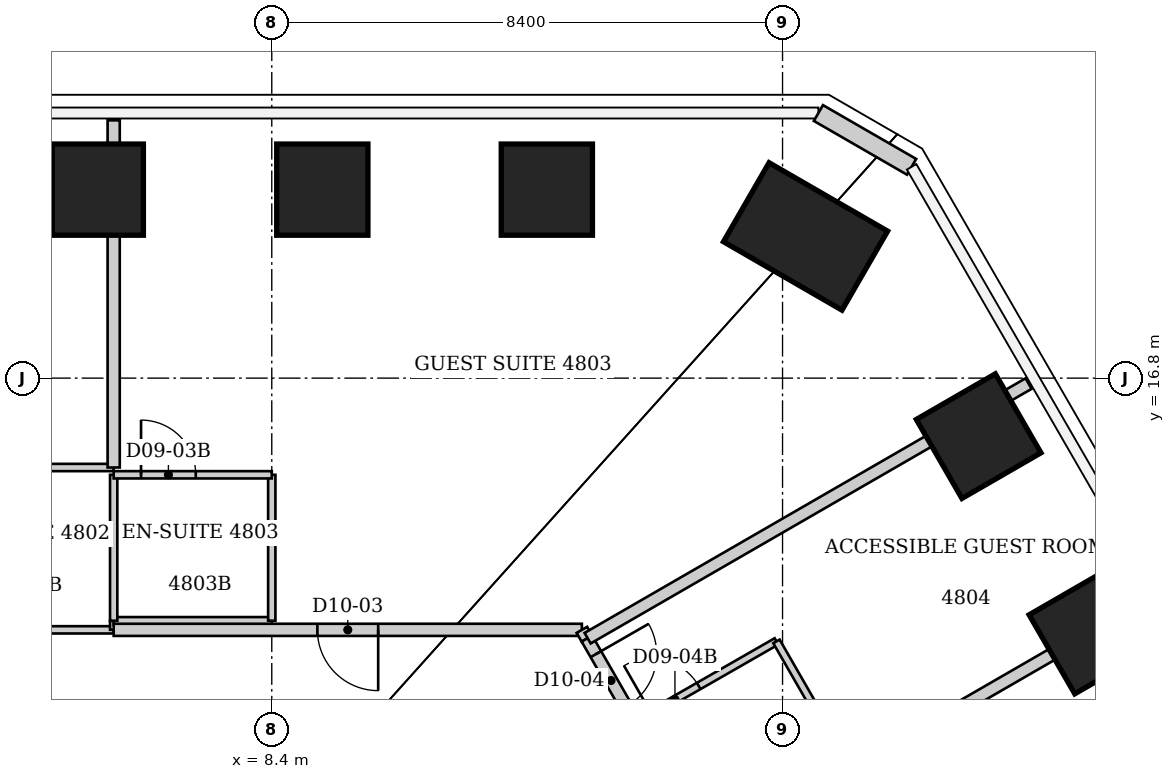
"""IFC4 building model, lengths in metres.
Left out: names, types, materials, properties, quantities, classifications, styles, units other than length and angle.
Written with IfcOpenShell. Run it as: python <this file> out.ifc"""

import sys

from ifc_helpers import new_model, si_unit, direction, frame, frame_2d, origin, origin_2d, place, context, subcontext, project, spatial, rectangle, extrude, element, fill, save


model = new_model("IFC4")
c1 = context("Model", 3, precision=1e-05, world=origin(), true_north=direction((0.0, 1.0)))
c2 = subcontext(c1, "Body", "Model", "MODEL_VIEW")
j1 = project(units=[si_unit("LENGTHUNIT", "METRE"), si_unit("PLANEANGLEUNIT", "RADIAN")], contexts=[c1])
p1 = place(None, origin())
s1 = spatial("IfcSite", under=j1, at=p1, CompositionType="ELEMENT")
p2 = place(p1, origin())
s2 = spatial("IfcBuilding", under=s1, at=p2, CompositionType="ELEMENT")
p3 = place(p2, frame((0.0, 0.0, 194.6)))
s3 = spatial("IfcBuildingStorey", under=s2, at=p3, CompositionType="ELEMENT", Elevation=194.6)
for number, where, z_axis, x_axis in (
    (1, (5.539, 19.9, 0.0), (0.0, 0.0, 1.0), (0.0, 1.0, 0.0)),
    (2, (9.231, 19.9, 0.0), (0.0, 0.0, 1.0), (0.0, 1.0, 0.0)),
    (3, (12.924, 19.9, 0.0), (0.0, 0.0, 1.0), (0.0, 1.0, 0.0)),
):
    element("IfcColumn", number, at=place(p3, frame(where, z_axis=z_axis, x_axis=x_axis)), inside=s3, PredefinedType="COLUMN", context=c2, shape_type="SweptSolid", body=[
        extrude(rectangle(XDim=1.5, YDim=1.5, at=origin_2d()), origin(), (0.0, 0.0, 1.0), 3.8),
    ])
p4 = place(p3, frame((17.178, 19.131, 0.0), z_axis=(0.0, 0.0, 1.0), x_axis=(0.5, 0.866025403784, 0.0)))
e4 = element("IfcColumn", 4, at=p4, inside=s3, PredefinedType="COLUMN", context=c2, shape_type="SweptSolid", body=[
    extrude(rectangle(XDim=1.5, YDim=2.25, at=origin_2d()), origin(), (0.0, 0.0, 1.0), 3.8),
])
for number, where, z_axis, x_axis in (
    (5, (20.025, 15.846, 0.0), (0.0, 0.0, 1.0), (0.866, 0.5, 0.0)),
    (6, (21.88, 12.633, 0.0), (0.0, 0.0, 1.0), (0.866, 0.5, 0.0)),
):
    element("IfcColumn", number, at=place(p3, frame(where, z_axis=z_axis, x_axis=x_axis)), inside=s3, PredefinedType="COLUMN", context=c2, shape_type="SweptSolid", body=[
        extrude(rectangle(XDim=1.5, YDim=1.5, at=origin_2d()), origin(), (0.0, 0.0, 1.0), 3.8),
    ])
p5 = place(p3, frame((17.39, 21.16, 0.0), z_axis=(0.0, 0.0, 1.0), x_axis=(0.866036293601, -0.499981137809, 0.0)))
e7 = element("IfcWall", 7, at=p5, inside=s3, PredefinedType="SOLIDWALL", context=c2, shape_type="SweptSolid", body=[
    extrude(rectangle(XDim=1.77, YDim=0.3, at=frame_2d((0.885, 0.0))), origin(), (0.0, 0.0, 1.0), 3.64),
])
p6 = place(p3, frame((5.8, 12.66, 0.0), z_axis=(0.0, 0.0, 1.0), x_axis=(-1.0, 0.0, 0.0)))
e8 = element("IfcWall", 8, at=p6, inside=s3, PredefinedType="PARTITIONING", context=c2, shape_type="SweptSolid", body=[
    extrude(rectangle(XDim=2.45, YDim=0.12, at=frame_2d((1.225, 0.0))), origin(), (0.0, 0.0, 1.0), 3.64),
])
p7 = place(p3, frame((5.8, 12.81, 0.0), z_axis=(0.0, 0.0, 1.0), x_axis=(0.0, -1.0, 0.0)))
e9 = element("IfcWall", 9, at=p7, inside=s3, PredefinedType="PARTITIONING", context=c2, shape_type="SweptSolid", body=[
    extrude(rectangle(XDim=0.15, YDim=0.12, at=frame_2d((0.075, 0.0))), origin(), (0.0, 0.0, 1.0), 3.64),
])
p8 = place(p3, frame((5.8, 12.81, 0.0), z_axis=(0.0, 0.0, 1.0), x_axis=(1.0, 0.0, 0.0)))
e10 = element("IfcWall", 10, at=p8, inside=s3, PredefinedType="PARTITIONING", context=c2, shape_type="SweptSolid", body=[
    extrude(rectangle(XDim=2.6, YDim=0.12, at=frame_2d((1.3, 0.0))), origin(), (0.0, 0.0, 1.0), 3.64),
])
p9 = place(p3, frame((5.8, 15.21, 0.0), z_axis=(0.0, 0.0, 1.0), x_axis=(0.0, -1.0, 0.0)))
e11 = element("IfcWall", 11, at=p9, inside=s3, PredefinedType="PARTITIONING", context=c2, shape_type="SweptSolid", body=[
    extrude(rectangle(XDim=2.4, YDim=0.12, at=frame_2d((1.2, 0.0))), origin(), (0.0, 0.0, 1.0), 3.64),
])
p10 = place(p3, frame((5.8, 15.33, 0.0), z_axis=(0.0, 0.0, 1.0), x_axis=(-1.0, 0.0, 0.0)))
e12 = element("IfcWall", 12, at=p10, inside=s3, PredefinedType="PARTITIONING", context=c2, shape_type="SweptSolid", body=[
    extrude(rectangle(XDim=2.45, YDim=0.12, at=frame_2d((1.225, 0.0))), origin(), (0.0, 0.0, 1.0), 3.64),
])
p11 = place(p3, frame((5.8, 21.04, 0.0), z_axis=(0.0, 0.0, 1.0), x_axis=(0.0, -1.0, 0.0)))
e13 = element("IfcWall", 13, at=p11, inside=s3, PredefinedType="PARTITIONING", context=c2, shape_type="SweptSolid", body=[
    extrude(rectangle(XDim=5.71, YDim=0.2, at=frame_2d((2.855, 0.0))), origin(), (0.0, 0.0, 1.0), 3.64),
])
p12 = place(p3, frame((8.4, 12.81, 0.0), z_axis=(0.0, 0.0, 1.0), x_axis=(0.0, 1.0, 0.0)))
e14 = element("IfcWall", 14, at=p12, inside=s3, PredefinedType="PARTITIONING", context=c2, shape_type="SweptSolid", body=[
    extrude(rectangle(XDim=2.4, YDim=0.12, at=frame_2d((1.2, 0.0))), origin(), (0.0, 0.0, 1.0), 3.64),
])
p13 = place(p3, frame((8.4, 15.21, 0.0), z_axis=(0.0, 0.0, 1.0), x_axis=(-1.0, 0.0, 0.0)))
e15 = element("IfcWall", 15, at=p13, inside=s3, PredefinedType="PARTITIONING", context=c2, shape_type="SweptSolid", body=[
    extrude(rectangle(XDim=2.6, YDim=0.12, at=frame_2d((1.3, 0.0))), origin(), (0.0, 0.0, 1.0), 3.64),
])
p14 = place(p13, frame((1.25, 0.0, 0.0)))
e16 = element("IfcOpeningElement", 16, at=p14, cuts=e15, PredefinedType="OPENING", context=c2, shape_type="SweptSolid", body=[
    extrude(rectangle(XDim=0.9, YDim=2.03, at=frame_2d((0.45, 1.015))), frame((0.0, 0.06, 0.0), z_axis=(0.0, -1.0, 0.0), x_axis=(1.0, 0.0, 0.0)), (0.0, 0.0, 1.0), 0.12),
])
p15 = place(p3, frame((13.5, 12.66, 0.0), z_axis=(0.0, 0.0, 1.0), x_axis=(-1.0, 0.0, 0.0)))
e17 = element("IfcWall", 17, at=p15, inside=s3, PredefinedType="PARTITIONING", context=c2, shape_type="SweptSolid", body=[
    extrude(rectangle(XDim=7.7, YDim=0.2, at=frame_2d((3.85, 0.0))), origin(), (0.0, 0.0, 1.0), 3.64),
])
p16 = place(p15, frame((3.35, 0.0, 0.0)))
e18 = element("IfcOpeningElement", 18, at=p16, cuts=e17, PredefinedType="OPENING", context=c2, shape_type="SweptSolid", body=[
    extrude(rectangle(XDim=1.0, YDim=2.13, at=frame_2d((0.5, 1.065))), frame((0.0, 0.1, 0.0), z_axis=(0.0, -1.0, 0.0), x_axis=(1.0, 0.0, 0.0)), (0.0, 0.0, 1.0), 0.2),
])
p17 = place(p3, frame((13.5, 12.66, 0.0), z_axis=(0.0, 0.0, 1.0), x_axis=(0.498194987799, -0.867065023013, 0.0)))
e19 = element("IfcWall", 19, at=p17, inside=s3, PredefinedType="PARTITIONING", context=c2, shape_type="SweptSolid", body=[
    extrude(rectangle(XDim=0.166, YDim=0.2, at=frame_2d((0.083, 0.0))), origin(), (0.0, 0.0, 1.0), 3.64),
])
p18 = place(p3, frame((13.583, 12.516, 0.0), z_axis=(0.0, 0.0, 1.0), x_axis=(0.498534585837, -0.866869809559, 0.0)))
e20 = element("IfcWall", 20, at=p18, inside=s3, PredefinedType="PARTITIONING", context=c2, shape_type="SweptSolid", body=[
    extrude(rectangle(XDim=1.59, YDim=0.2, at=frame_2d((0.795, 0.0))), origin(), (0.0, 0.0, 1.0), 3.64),
])
p19 = place(p18, frame((0.295, 0.0, 0.0)))
e21 = element("IfcOpeningElement", 21, at=p19, cuts=e20, PredefinedType="OPENING", context=c2, shape_type="SweptSolid", body=[
    extrude(rectangle(XDim=1.0, YDim=2.13, at=frame_2d((0.5, 1.065))), frame((0.0, 0.1, 0.0), z_axis=(0.0, -1.0, 0.0), x_axis=(1.0, 0.0, 0.0)), (0.0, 0.0, 1.0), 0.2),
])
p20 = place(p3, frame((16.7, 12.47, 0.0), z_axis=(0.0, 0.0, 1.0), x_axis=(-0.867545659855, -0.497357545501, 0.0)))
e22 = element("IfcWall", 22, at=p20, inside=s3, PredefinedType="PARTITIONING", context=c2, shape_type="SweptSolid", body=[
    extrude(rectangle(XDim=2.674, YDim=0.12, at=frame_2d((1.337, 0.0))), origin(), (0.0, 0.0, 1.0), 3.64),
])
p21 = place(p20, frame((1.474, 0.0, 0.0)))
e23 = element("IfcOpeningElement", 23, at=p21, cuts=e22, PredefinedType="OPENING", context=c2, shape_type="SweptSolid", body=[
    extrude(rectangle(XDim=0.9, YDim=2.03, at=frame_2d((0.45, 1.015))), frame((0.0, 0.06, 0.0), z_axis=(0.0, -1.0, 0.0), x_axis=(1.0, 0.0, 0.0)), (0.0, 0.0, 1.0), 0.12),
])
p22 = place(p3, frame((17.92, 10.35, 0.0), z_axis=(0.0, 0.0, 1.0), x_axis=(-0.498791783817, 0.866721844883, 0.0)))
e24 = element("IfcWall", 24, at=p22, inside=s3, PredefinedType="PARTITIONING", context=c2, shape_type="SweptSolid", body=[
    extrude(rectangle(XDim=2.446, YDim=0.12, at=frame_2d((1.223, 0.0))), origin(), (0.0, 0.0, 1.0), 3.64),
])
p23 = place(p3, frame((17.923, 10.345, 0.0), z_axis=(0.0, 0.0, 1.0), x_axis=(0.865991848905, 0.500058114253, 0.0)))
e25 = element("IfcWall", 25, at=p23, inside=s3, PredefinedType="PARTITIONING", context=c2, shape_type="SweptSolid", body=[
    extrude(rectangle(XDim=5.708, YDim=0.2, at=frame_2d((2.854, 0.0))), origin(), (0.0, 0.0, 1.0), 2.878),
])
p24 = place(p3, frame((20.846, 16.71, 0.0), z_axis=(0.0, 0.0, 1.0), x_axis=(-0.865987970466, -0.500064830806, 0.0)))
e26 = element("IfcWall", 26, at=p24, inside=s3, PredefinedType="PARTITIONING", context=c2, shape_type="SweptSolid", body=[
    extrude(rectangle(XDim=8.374, YDim=0.2, at=frame_2d((4.187, 0.0))), origin(), (0.0, 0.0, 1.0), 3.64),
])
p25 = place(p16, origin())
e27 = element("IfcDoor", 27, at=p25, inside=s3, OperationType="SINGLE_SWING_LEFT", PredefinedType="DOOR", context=c2, shape_type="SweptSolid", body=[
    extrude(rectangle(XDim=1.0, YDim=2.13, at=frame_2d((0.5, 1.065))), frame((0.0, 0.025, 0.0), z_axis=(0.0, -1.0, 0.0), x_axis=(1.0, 0.0, 0.0)), (0.0, 0.0, 1.0), 0.05),
])
fill(e18, e27)
p26 = place(p14, origin())
e28 = element("IfcDoor", 28, at=p26, inside=s3, OperationType="SINGLE_SWING_RIGHT", PredefinedType="DOOR", context=c2, shape_type="SweptSolid", body=[
    extrude(rectangle(XDim=0.9, YDim=2.03, at=frame_2d((0.45, 1.015))), frame((0.0, 0.025, 0.0), z_axis=(0.0, -1.0, 0.0), x_axis=(1.0, 0.0, 0.0)), (0.0, 0.0, 1.0), 0.05),
])
fill(e16, e28)
p27 = place(p19, origin())
e29 = element("IfcDoor", 29, at=p27, inside=s3, OperationType="SINGLE_SWING_LEFT", PredefinedType="DOOR", context=c2, shape_type="SweptSolid", body=[
    extrude(rectangle(XDim=1.0, YDim=2.13, at=frame_2d((0.5, 1.065))), frame((0.0, 0.025, 0.0), z_axis=(0.0, -1.0, 0.0), x_axis=(1.0, 0.0, 0.0)), (0.0, 0.0, 1.0), 0.05),
])
fill(e21, e29)
p28 = place(p21, origin())
e30 = element("IfcDoor", 30, at=p28, inside=s3, OperationType="SINGLE_SWING_RIGHT", PredefinedType="DOOR", context=c2, shape_type="SweptSolid", body=[
    extrude(rectangle(XDim=0.9, YDim=2.03, at=frame_2d((0.45, 1.015))), frame((0.0, 0.025, 0.0), z_axis=(0.0, -1.0, 0.0), x_axis=(1.0, 0.0, 0.0)), (0.0, 0.0, 1.0), 0.05),
])
fill(e23, e30)
save(model, sys.argv[1])
